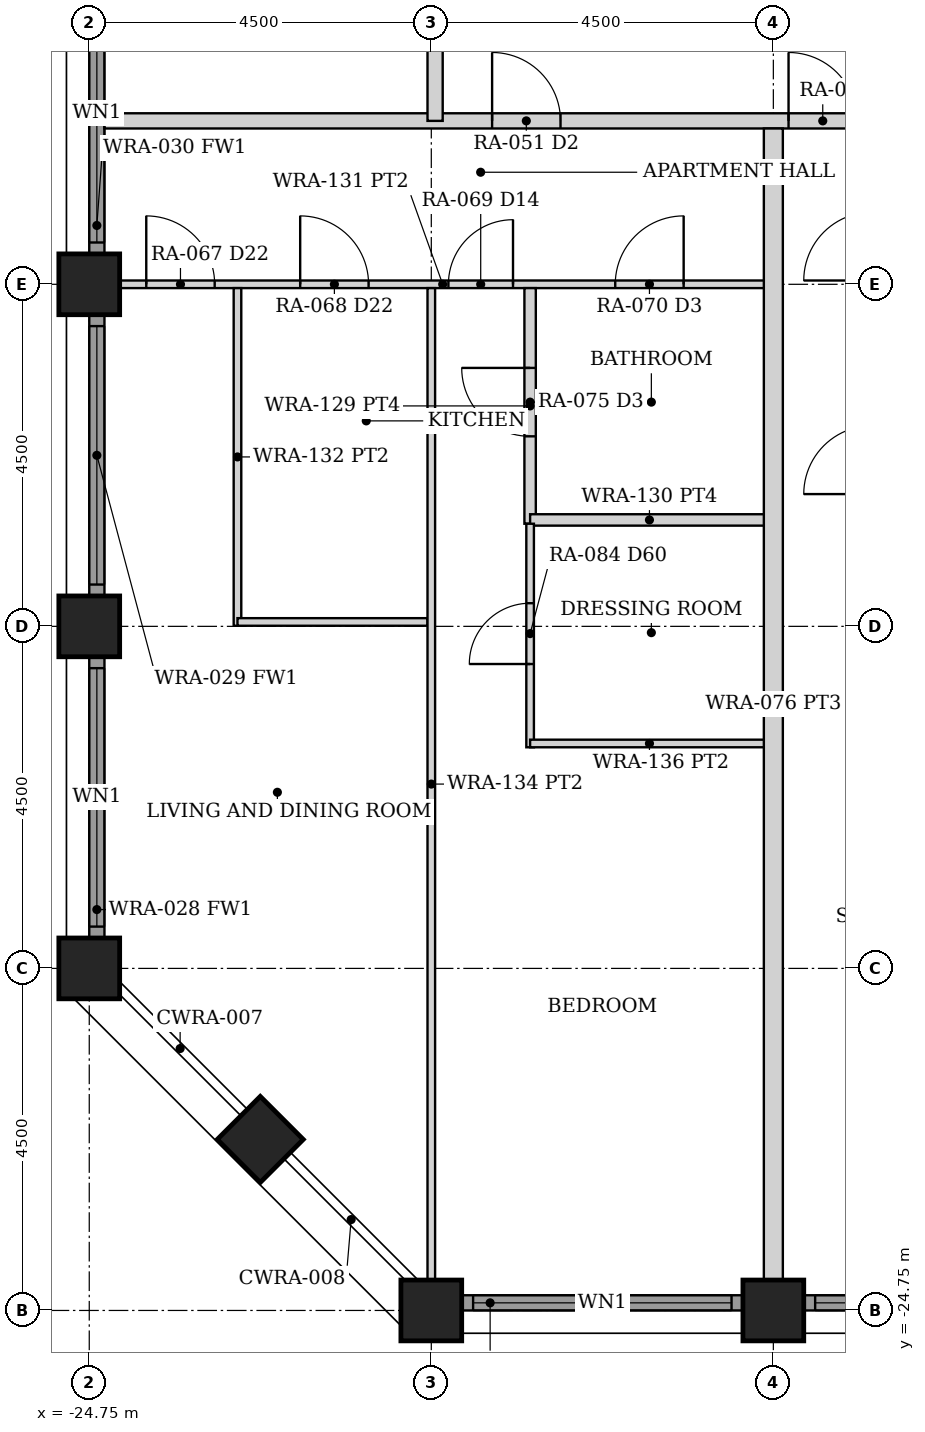
"""IFC4 building model, lengths in metres.
Left out: names, types, materials, properties, quantities, classifications, styles, units other than length and angle.
Written with IfcOpenShell. Run it as: python <this file> out.ifc"""

import sys

from ifc_helpers import new_model, si_unit, direction, frame, frame_2d, origin, origin_2d, place, context, subcontext, project, spatial, rectangle, hollow_rectangle, extrude, element, fill, save


model = new_model("IFC4")
c1 = context("Model", 3, precision=1e-05, world=origin(), true_north=direction((0.0, 1.0)))
c2 = subcontext(c1, "Body", "Model", "MODEL_VIEW")
j1 = project(units=[si_unit("LENGTHUNIT", "METRE"), si_unit("PLANEANGLEUNIT", "RADIAN")], contexts=[c1])
p1 = place(None, origin())
s1 = spatial("IfcSite", under=j1, at=p1, CompositionType="ELEMENT")
p2 = place(p1, origin())
s2 = spatial("IfcBuilding", under=s1, at=p2, CompositionType="ELEMENT")
p3 = place(p2, frame((0.0, 0.0, 30.0)))
s3 = spatial("IfcBuildingStorey", under=s2, at=p3, CompositionType="ELEMENT", Elevation=30.0)
for number, where, z_axis, x_axis in (
    (1, (-20.25, -24.75, 0.0), (0.0, 0.0, 1.0), (0.0, 1.0, 0.0)),
    (2, (-24.75, -20.25, 0.0), (0.0, 0.0, 1.0), (1.0, 0.0, 0.0)),
    (3, (-15.75, -24.75, 0.0), (0.0, 0.0, 1.0), (0.0, 1.0, 0.0)),
    (4, (-24.75, -15.75, 0.0), (0.0, 0.0, 1.0), (1.0, 0.0, 0.0)),
    (5, (-24.75, -11.25, 0.0), (0.0, 0.0, 1.0), (1.0, 0.0, 0.0)),
    (6, (-22.5, -22.5, 0.0), (0.0, 0.0, 1.0), (0.707, 0.707, 0.0)),
):
    element("IfcColumn", number, at=place(p3, frame(where, z_axis=z_axis, x_axis=x_axis)), inside=s3, PredefinedType="COLUMN", context=c2, shape_type="SweptSolid", body=[
        extrude(hollow_rectangle(XDim=0.8, YDim=0.8, WallThickness=0.08, at=origin_2d()), origin(), (0.0, 0.0, 1.0), 3.5),
    ])
p4 = place(p3, frame((-19.845, -24.65, 0.0), z_axis=(0.0, 0.0, 1.0), x_axis=(1.0, 0.0, 0.0)))
e7 = element("IfcWall", 7, at=p4, inside=s3, PredefinedType="SOLIDWALL", context=c2, shape_type="SweptSolid", body=[
    extrude(rectangle(XDim=3.69, YDim=0.2, at=frame_2d((1.845, 0.0))), origin(), (0.0, 0.0, 1.0), 2.379),
])
p5 = place(p4, frame((0.145, 0.0, 0.3)))
e8 = element("IfcOpeningElement", 8, at=p5, cuts=e7, PredefinedType="OPENING", context=c2, shape_type="SweptSolid", body=[
    extrude(rectangle(XDim=3.4, YDim=1.929, at=frame_2d((1.7, 0.964))), frame((0.0, 0.11, 0.0), z_axis=(0.0, -1.0, 0.0), x_axis=(1.0, 0.0, 0.0)), (0.0, 0.0, 1.0), 0.22),
])
p6 = place(p3, frame((-15.345, -24.65, 0.0), z_axis=(0.0, 0.0, 1.0), x_axis=(1.0, 0.0, 0.0)))
e9 = element("IfcWall", 9, at=p6, inside=s3, PredefinedType="SOLIDWALL", context=c2, shape_type="SweptSolid", body=[
    extrude(rectangle(XDim=3.69, YDim=0.2, at=frame_2d((1.845, 0.0))), origin(), (0.0, 0.0, 1.0), 2.379),
])
p7 = place(p6, frame((0.145, 0.0, 0.3)))
e10 = element("IfcOpeningElement", 10, at=p7, cuts=e9, PredefinedType="OPENING", context=c2, shape_type="SweptSolid", body=[
    extrude(rectangle(XDim=3.4, YDim=1.929, at=frame_2d((1.7, 0.964))), frame((0.0, 0.11, 0.0), z_axis=(0.0, -1.0, 0.0), x_axis=(1.0, 0.0, 0.0)), (0.0, 0.0, 1.0), 0.22),
])
p8 = place(p3, frame((-24.65, -19.845, 0.0), z_axis=(0.0, 0.0, 1.0), x_axis=(0.0, 1.0, 0.0)))
e11 = element("IfcWall", 11, at=p8, inside=s3, PredefinedType="SOLIDWALL", context=c2, shape_type="SweptSolid", body=[
    extrude(rectangle(XDim=3.69, YDim=0.2, at=frame_2d((1.845, 0.0))), origin(), (0.0, 0.0, 1.0), 2.379),
])
p9 = place(p8, frame((0.145, 0.0, 0.3)))
e12 = element("IfcOpeningElement", 12, at=p9, cuts=e11, PredefinedType="OPENING", context=c2, shape_type="SweptSolid", body=[
    extrude(rectangle(XDim=3.4, YDim=1.929, at=frame_2d((1.7, 0.964))), frame((0.0, 0.11, 0.0), z_axis=(0.0, -1.0, 0.0), x_axis=(1.0, 0.0, 0.0)), (0.0, 0.0, 1.0), 0.22),
])
p10 = place(p3, frame((-24.65, -15.345, 0.0), z_axis=(0.0, 0.0, 1.0), x_axis=(0.0, 1.0, 0.0)))
e13 = element("IfcWall", 13, at=p10, inside=s3, PredefinedType="SOLIDWALL", context=c2, shape_type="SweptSolid", body=[
    extrude(rectangle(XDim=3.69, YDim=0.2, at=frame_2d((1.845, 0.0))), origin(), (0.0, 0.0, 1.0), 2.379),
])
p11 = place(p10, frame((0.145, 0.0, 0.3)))
e14 = element("IfcOpeningElement", 14, at=p11, cuts=e13, PredefinedType="OPENING", context=c2, shape_type="SweptSolid", body=[
    extrude(rectangle(XDim=3.4, YDim=1.929, at=frame_2d((1.7, 0.964))), frame((0.0, 0.11, 0.0), z_axis=(0.0, -1.0, 0.0), x_axis=(1.0, 0.0, 0.0)), (0.0, 0.0, 1.0), 0.22),
])
p12 = place(p3, frame((-24.65, -10.845, 0.0), z_axis=(0.0, 0.0, 1.0), x_axis=(0.0, 1.0, 0.0)))
e15 = element("IfcWall", 15, at=p12, inside=s3, PredefinedType="SOLIDWALL", context=c2, shape_type="SweptSolid", body=[
    extrude(rectangle(XDim=3.69, YDim=0.2, at=frame_2d((1.845, 0.0))), origin(), (0.0, 0.0, 1.0), 2.379),
])
p13 = place(p12, frame((0.145, 0.0, 0.3)))
e16 = element("IfcOpeningElement", 16, at=p13, cuts=e15, PredefinedType="OPENING", context=c2, shape_type="SweptSolid", body=[
    extrude(rectangle(XDim=3.4, YDim=1.929, at=frame_2d((1.7, 0.964))), frame((0.0, 0.11, 0.0), z_axis=(0.0, -1.0, 0.0), x_axis=(1.0, 0.0, 0.0)), (0.0, 0.0, 1.0), 0.22),
])
p14 = place(p3, frame((-24.55, -9.1, 0.0), z_axis=(0.0, 0.0, 1.0), x_axis=(1.0, 0.0, 0.0)))
e17 = element("IfcWall", 17, at=p14, inside=s3, PredefinedType="PARTITIONING", context=c2, shape_type="SweptSolid", body=[
    extrude(rectangle(XDim=49.1, YDim=0.2, at=frame_2d((24.55, 0.0))), origin(), (0.0, 0.0, 1.0), 2.373),
])
p15 = place(p14, frame((5.1, 0.0, 0.0)))
e18 = element("IfcOpeningElement", 18, at=p15, cuts=e17, PredefinedType="OPENING", context=c2, shape_type="SweptSolid", body=[
    extrude(rectangle(XDim=0.9, YDim=2.1, at=frame_2d((0.45, 1.05))), frame((0.0, 0.11, 0.0), z_axis=(0.0, -1.0, 0.0), x_axis=(1.0, 0.0, 0.0)), (0.0, 0.0, 1.0), 0.22),
])
p16 = place(p14, frame((9.0, 0.0, 0.0)))
e19 = element("IfcOpeningElement", 19, at=p16, cuts=e17, PredefinedType="OPENING", context=c2, shape_type="SweptSolid", body=[
    extrude(rectangle(XDim=0.9, YDim=2.1, at=frame_2d((0.45, 1.05))), frame((0.0, 0.11, 0.0), z_axis=(0.0, -1.0, 0.0), x_axis=(1.0, 0.0, 0.0)), (0.0, 0.0, 1.0), 0.22),
])
p17 = place(p14, frame((13.5, 0.0, 0.0)))
e20 = element("IfcOpeningElement", 20, at=p17, cuts=e17, PredefinedType="OPENING", context=c2, shape_type="SweptSolid", body=[
    extrude(rectangle(XDim=0.9, YDim=2.1, at=frame_2d((0.45, 1.05))), frame((0.0, 0.11, 0.0), z_axis=(0.0, -1.0, 0.0), x_axis=(1.0, 0.0, 0.0)), (0.0, 0.0, 1.0), 0.22),
])
p18 = place(p14, frame((18.0, 0.0, 0.0)))
e21 = element("IfcOpeningElement", 21, at=p18, cuts=e17, PredefinedType="OPENING", context=c2, shape_type="SweptSolid", body=[
    extrude(rectangle(XDim=0.9, YDim=2.1, at=frame_2d((0.45, 1.05))), frame((0.0, 0.11, 0.0), z_axis=(0.0, -1.0, 0.0), x_axis=(1.0, 0.0, 0.0)), (0.0, 0.0, 1.0), 0.22),
])
p19 = place(p14, frame((22.5, 0.0, 0.0)))
e22 = element("IfcOpeningElement", 22, at=p19, cuts=e17, PredefinedType="OPENING", context=c2, shape_type="SweptSolid", body=[
    extrude(rectangle(XDim=0.9, YDim=2.1, at=frame_2d((0.45, 1.05))), frame((0.0, 0.11, 0.0), z_axis=(0.0, -1.0, 0.0), x_axis=(1.0, 0.0, 0.0)), (0.0, 0.0, 1.0), 0.22),
])
p20 = place(p14, frame((27.0, 0.0, 0.0)))
e23 = element("IfcOpeningElement", 23, at=p20, cuts=e17, PredefinedType="OPENING", context=c2, shape_type="SweptSolid", body=[
    extrude(rectangle(XDim=0.9, YDim=2.1, at=frame_2d((0.45, 1.05))), frame((0.0, 0.11, 0.0), z_axis=(0.0, -1.0, 0.0), x_axis=(1.0, 0.0, 0.0)), (0.0, 0.0, 1.0), 0.22),
])
p21 = place(p14, frame((31.5, 0.0, 0.0)))
e24 = element("IfcOpeningElement", 24, at=p21, cuts=e17, PredefinedType="OPENING", context=c2, shape_type="SweptSolid", body=[
    extrude(rectangle(XDim=0.9, YDim=2.1, at=frame_2d((0.45, 1.05))), frame((0.0, 0.11, 0.0), z_axis=(0.0, -1.0, 0.0), x_axis=(1.0, 0.0, 0.0)), (0.0, 0.0, 1.0), 0.22),
])
p22 = place(p14, frame((36.0, 0.0, 0.0)))
e25 = element("IfcOpeningElement", 25, at=p22, cuts=e17, PredefinedType="OPENING", context=c2, shape_type="SweptSolid", body=[
    extrude(rectangle(XDim=0.9, YDim=2.1, at=frame_2d((0.45, 1.05))), frame((0.0, 0.11, 0.0), z_axis=(0.0, -1.0, 0.0), x_axis=(1.0, 0.0, 0.0)), (0.0, 0.0, 1.0), 0.22),
])
p23 = place(p14, frame((43.1, 0.0, 0.0)))
e26 = element("IfcOpeningElement", 26, at=p23, cuts=e17, PredefinedType="OPENING", context=c2, shape_type="SweptSolid", body=[
    extrude(rectangle(XDim=0.9, YDim=2.1, at=frame_2d((0.45, 1.05))), frame((0.0, 0.11, 0.0), z_axis=(0.0, -1.0, 0.0), x_axis=(1.0, 0.0, 0.0)), (0.0, 0.0, 1.0), 0.22),
])
p24 = place(p3, frame((-20.2, -9.1, 0.0), z_axis=(0.0, 0.0, 1.0), x_axis=(0.0, 1.0, 0.0)))
e27 = element("IfcWall", 27, at=p24, inside=s3, PredefinedType="PARTITIONING", context=c2, shape_type="SweptSolid", body=[
    extrude(rectangle(XDim=18.2, YDim=0.2, at=frame_2d((9.1, 0.0))), origin(), (0.0, 0.0, 1.0), 2.373),
])
p25 = place(p24, frame((8.6, 0.0, 0.0)))
e28 = element("IfcOpeningElement", 28, at=p25, cuts=e27, PredefinedType="OPENING", context=c2, shape_type="SweptSolid", body=[
    extrude(rectangle(XDim=1.0, YDim=2.1, at=frame_2d((0.5, 1.05))), frame((0.0, 0.11, 0.0), z_axis=(0.0, -1.0, 0.0), x_axis=(1.0, 0.0, 0.0)), (0.0, 0.0, 1.0), 0.22),
])
p26 = place(p3, frame((-24.35, -11.25, 0.0), z_axis=(0.0, 0.0, 1.0), x_axis=(1.0, 0.0, 0.0)))
e29 = element("IfcWall", 29, at=p26, inside=s3, PredefinedType="PARTITIONING", context=c2, shape_type="SweptSolid", body=[
    extrude(rectangle(XDim=8.5, YDim=0.1, at=frame_2d((4.25, 0.0))), origin(), (0.0, 0.0, 1.0), 2.373),
])
p27 = place(p26, frame((2.375, 0.0, 0.0)))
e30 = element("IfcOpeningElement", 30, at=p27, cuts=e29, PredefinedType="OPENING", context=c2, shape_type="SweptSolid", body=[
    extrude(rectangle(XDim=0.9, YDim=2.1, at=frame_2d((0.45, 1.05))), frame((0.0, 0.06, 0.0), z_axis=(0.0, -1.0, 0.0), x_axis=(1.0, 0.0, 0.0)), (0.0, 0.0, 1.0), 0.12),
])
p28 = place(p26, frame((0.35, 0.0, 0.0)))
e31 = element("IfcOpeningElement", 31, at=p28, cuts=e29, PredefinedType="OPENING", context=c2, shape_type="SweptSolid", body=[
    extrude(rectangle(XDim=0.9, YDim=2.1, at=frame_2d((0.45, 1.05))), frame((0.0, 0.06, 0.0), z_axis=(0.0, -1.0, 0.0), x_axis=(1.0, 0.0, 0.0)), (0.0, 0.0, 1.0), 0.12),
])
p29 = place(p26, frame((4.325, 0.0, 0.0)))
e32 = element("IfcOpeningElement", 32, at=p29, cuts=e29, PredefinedType="OPENING", context=c2, shape_type="SweptSolid", body=[
    extrude(rectangle(XDim=0.85, YDim=2.1, at=frame_2d((0.425, 1.05))), frame((0.0, 0.06, 0.0), z_axis=(0.0, -1.0, 0.0), x_axis=(1.0, 0.0, 0.0)), (0.0, 0.0, 1.0), 0.12),
])
p30 = place(p26, frame((6.52, 0.0, 0.0)))
e33 = element("IfcOpeningElement", 33, at=p30, cuts=e29, PredefinedType="OPENING", context=c2, shape_type="SweptSolid", body=[
    extrude(rectangle(XDim=0.9, YDim=2.1, at=frame_2d((0.45, 1.05))), frame((0.0, 0.06, 0.0), z_axis=(0.0, -1.0, 0.0), x_axis=(1.0, 0.0, 0.0)), (0.0, 0.0, 1.0), 0.12),
])
p31 = place(p3, frame((-22.8, -15.742, 0.0), z_axis=(0.0, 0.0, 1.0), x_axis=(0.0, 1.0, 0.0)))
e34 = element("IfcWall", 34, at=p31, inside=s3, PredefinedType="PARTITIONING", context=c2, shape_type="SweptSolid", body=[
    extrude(rectangle(XDim=4.442, YDim=0.1, at=frame_2d((2.221, 0.0))), origin(), (0.0, 0.0, 1.0), 2.373),
])
p32 = place(p3, frame((-22.8, -15.692, 0.0), z_axis=(0.0, 0.0, 1.0), x_axis=(1.0, 0.0, 0.0)))
e35 = element("IfcWall", 35, at=p32, inside=s3, PredefinedType="PARTITIONING", context=c2, shape_type="SweptSolid", body=[
    extrude(rectangle(XDim=2.5, YDim=0.1, at=frame_2d((1.25, 0.0))), origin(), (0.0, 0.0, 1.0), 2.373),
])
p33 = place(p3, frame((-20.25, -24.35, 0.0), z_axis=(0.0, 0.0, 1.0), x_axis=(0.0, 1.0, 0.0)))
e36 = element("IfcWall", 36, at=p33, inside=s3, PredefinedType="PARTITIONING", context=c2, shape_type="SweptSolid", body=[
    extrude(rectangle(XDim=13.05, YDim=0.1, at=frame_2d((6.525, 0.0))), origin(), (0.0, 0.0, 1.0), 2.373),
])
p34 = place(p3, frame((-18.95, -14.4, 0.0), z_axis=(0.0, 0.0, 1.0), x_axis=(0.0, 1.0, 0.0)))
e37 = element("IfcWall", 37, at=p34, inside=s3, PredefinedType="PARTITIONING", context=c2, shape_type="SweptSolid", body=[
    extrude(rectangle(XDim=3.1, YDim=0.15, at=frame_2d((1.55, 0.0))), origin(), (0.0, 0.0, 1.0), 2.373),
])
p35 = place(p34, frame((1.15, 0.0, 0.0)))
e38 = element("IfcOpeningElement", 38, at=p35, cuts=e37, PredefinedType="OPENING", context=c2, shape_type="SweptSolid", body=[
    extrude(rectangle(XDim=0.9, YDim=2.1, at=frame_2d((0.45, 1.05))), frame((0.0, 0.085, 0.0), z_axis=(0.0, -1.0, 0.0), x_axis=(1.0, 0.0, 0.0)), (0.0, 0.0, 1.0), 0.17),
])
p36 = place(p3, frame((-18.95, -14.35, 0.0), z_axis=(0.0, 0.0, 1.0), x_axis=(1.0, 0.0, 0.0)))
e39 = element("IfcWall", 39, at=p36, inside=s3, PredefinedType="PARTITIONING", context=c2, shape_type="SweptSolid", body=[
    extrude(rectangle(XDim=3.14, YDim=0.15, at=frame_2d((1.57, 0.0))), origin(), (0.0, 0.0, 1.0), 2.373),
])
p37 = place(p3, frame((-18.95, -17.341, 0.0), z_axis=(0.0, 0.0, 1.0), x_axis=(0.0, 1.0, 0.0)))
e40 = element("IfcWall", 40, at=p37, inside=s3, PredefinedType="PARTITIONING", context=c2, shape_type="SweptSolid", body=[
    extrude(rectangle(XDim=2.941, YDim=0.1, at=frame_2d((1.47, 0.0))), origin(), (0.0, 0.0, 1.0), 2.373),
])
p38 = place(p37, frame((1.095, 0.0, 0.0)))
e41 = element("IfcOpeningElement", 41, at=p38, cuts=e40, PredefinedType="OPENING", context=c2, shape_type="SweptSolid", body=[
    extrude(rectangle(XDim=0.8, YDim=2.1, at=frame_2d((0.4, 1.05))), frame((0.0, 0.06, 0.0), z_axis=(0.0, -1.0, 0.0), x_axis=(1.0, 0.0, 0.0)), (0.0, 0.0, 1.0), 0.12),
])
p39 = place(p3, frame((-18.95, -17.291, 0.0), z_axis=(0.0, 0.0, 1.0), x_axis=(1.0, 0.0, 0.0)))
e42 = element("IfcWall", 42, at=p39, inside=s3, PredefinedType="PARTITIONING", context=c2, shape_type="SweptSolid", body=[
    extrude(rectangle(XDim=3.14, YDim=0.1, at=frame_2d((1.57, 0.0))), origin(), (0.0, 0.0, 1.0), 2.373),
])
p40 = place(p3, frame((-15.75, -24.35, 0.0), z_axis=(0.0, 0.0, 1.0), x_axis=(0.0, 1.0, 0.0)))
e43 = element("IfcWall", 43, at=p40, inside=s3, PredefinedType="PARTITIONING", context=c2, shape_type="SweptSolid", body=[
    extrude(rectangle(XDim=15.15, YDim=0.25, at=frame_2d((7.575, 0.0))), origin(), (0.0, 0.0, 1.0), 2.373),
])
p41 = place(p5, origin())
e44 = element("IfcWindow", 44, at=p41, inside=s3, PartitioningType="SINGLE_PANEL", PredefinedType="WINDOW", context=c2, shape_type="SweptSolid", body=[
    extrude(rectangle(XDim=3.4, YDim=1.929, at=frame_2d((1.7, 0.964))), frame((0.0, 0.03, 0.0), z_axis=(0.0, -1.0, 0.0), x_axis=(1.0, 0.0, 0.0)), (0.0, 0.0, 1.0), 0.06),
])
fill(e8, e44)
p42 = place(p7, origin())
e45 = element("IfcWindow", 45, at=p42, inside=s3, PartitioningType="SINGLE_PANEL", PredefinedType="WINDOW", context=c2, shape_type="SweptSolid", body=[
    extrude(rectangle(XDim=3.4, YDim=1.929, at=frame_2d((1.7, 0.964))), frame((0.0, 0.03, 0.0), z_axis=(0.0, -1.0, 0.0), x_axis=(1.0, 0.0, 0.0)), (0.0, 0.0, 1.0), 0.06),
])
fill(e10, e45)
p43 = place(p9, origin())
e46 = element("IfcWindow", 46, at=p43, inside=s3, PartitioningType="SINGLE_PANEL", PredefinedType="WINDOW", context=c2, shape_type="SweptSolid", body=[
    extrude(rectangle(XDim=3.4, YDim=1.929, at=frame_2d((1.7, 0.964))), frame((0.0, 0.03, 0.0), z_axis=(0.0, -1.0, 0.0), x_axis=(1.0, 0.0, 0.0)), (0.0, 0.0, 1.0), 0.06),
])
fill(e12, e46)
p44 = place(p11, origin())
e47 = element("IfcWindow", 47, at=p44, inside=s3, PartitioningType="SINGLE_PANEL", PredefinedType="WINDOW", context=c2, shape_type="SweptSolid", body=[
    extrude(rectangle(XDim=3.4, YDim=1.929, at=frame_2d((1.7, 0.964))), frame((0.0, 0.03, 0.0), z_axis=(0.0, -1.0, 0.0), x_axis=(1.0, 0.0, 0.0)), (0.0, 0.0, 1.0), 0.06),
])
fill(e14, e47)
p45 = place(p13, origin())
e48 = element("IfcWindow", 48, at=p45, inside=s3, PartitioningType="SINGLE_PANEL", PredefinedType="WINDOW", context=c2, shape_type="SweptSolid", body=[
    extrude(rectangle(XDim=3.4, YDim=1.929, at=frame_2d((1.7, 0.964))), frame((0.0, 0.03, 0.0), z_axis=(0.0, -1.0, 0.0), x_axis=(1.0, 0.0, 0.0)), (0.0, 0.0, 1.0), 0.06),
])
fill(e16, e48)
p46 = place(p15, origin())
e49 = element("IfcDoor", 49, at=p46, inside=s3, OperationType="SINGLE_SWING_LEFT", PredefinedType="DOOR", context=c2, shape_type="SweptSolid", body=[
    extrude(rectangle(XDim=0.9, YDim=2.1, at=frame_2d((0.45, 1.05))), frame((0.0, 0.025, 0.0), z_axis=(0.0, -1.0, 0.0), x_axis=(1.0, 0.0, 0.0)), (0.0, 0.0, 1.0), 0.05),
])
fill(e18, e49)
p47 = place(p27, origin())
e50 = element("IfcDoor", 50, at=p47, inside=s3, OperationType="SINGLE_SWING_LEFT", PredefinedType="DOOR", context=c2, shape_type="SweptSolid", body=[
    extrude(rectangle(XDim=0.9, YDim=2.1, at=frame_2d((0.45, 1.05))), frame((0.0, 0.025, 0.0), z_axis=(0.0, -1.0, 0.0), x_axis=(1.0, 0.0, 0.0)), (0.0, 0.0, 1.0), 0.05),
])
fill(e30, e50)
p48 = place(p28, origin())
e51 = element("IfcDoor", 51, at=p48, inside=s3, OperationType="SINGLE_SWING_LEFT", PredefinedType="DOOR", context=c2, shape_type="SweptSolid", body=[
    extrude(rectangle(XDim=0.9, YDim=2.1, at=frame_2d((0.45, 1.05))), frame((0.0, 0.025, 0.0), z_axis=(0.0, -1.0, 0.0), x_axis=(1.0, 0.0, 0.0)), (0.0, 0.0, 1.0), 0.05),
])
fill(e31, e51)
p49 = place(p29, origin())
e52 = element("IfcDoor", 52, at=p49, inside=s3, OperationType="SINGLE_SWING_RIGHT", PredefinedType="DOOR", context=c2, shape_type="SweptSolid", body=[
    extrude(rectangle(XDim=0.85, YDim=2.1, at=frame_2d((0.425, 1.05))), frame((0.0, 0.025, 0.0), z_axis=(0.0, -1.0, 0.0), x_axis=(1.0, 0.0, 0.0)), (0.0, 0.0, 1.0), 0.05),
])
fill(e32, e52)
p50 = place(p35, origin())
e53 = element("IfcDoor", 53, at=p50, inside=s3, OperationType="SINGLE_SWING_RIGHT", PredefinedType="DOOR", context=c2, shape_type="SweptSolid", body=[
    extrude(rectangle(XDim=0.9, YDim=2.1, at=frame_2d((0.45, 1.05))), frame((0.0, 0.025, 0.0), z_axis=(0.0, -1.0, 0.0), x_axis=(1.0, 0.0, 0.0)), (0.0, 0.0, 1.0), 0.05),
])
fill(e38, e53)
p51 = place(p30, origin())
e54 = element("IfcDoor", 54, at=p51, inside=s3, OperationType="SINGLE_SWING_RIGHT", PredefinedType="DOOR", context=c2, shape_type="SweptSolid", body=[
    extrude(rectangle(XDim=0.9, YDim=2.1, at=frame_2d((0.45, 1.05))), frame((0.0, 0.025, 0.0), z_axis=(0.0, -1.0, 0.0), x_axis=(1.0, 0.0, 0.0)), (0.0, 0.0, 1.0), 0.05),
])
fill(e33, e54)
p52 = place(p38, origin())
e55 = element("IfcDoor", 55, at=p52, inside=s3, OperationType="SINGLE_SWING_LEFT", PredefinedType="DOOR", context=c2, shape_type="SweptSolid", body=[
    extrude(rectangle(XDim=0.8, YDim=2.1, at=frame_2d((0.4, 1.05))), frame((0.0, 0.025, 0.0), z_axis=(0.0, -1.0, 0.0), x_axis=(1.0, 0.0, 0.0)), (0.0, 0.0, 1.0), 0.05),
])
fill(e41, e55)
p53 = place(p16, origin())
e56 = element("IfcDoor", 56, at=p53, inside=s3, OperationType="SINGLE_SWING_LEFT", PredefinedType="DOOR", context=c2, shape_type="SweptSolid", body=[
    extrude(rectangle(XDim=0.9, YDim=2.1, at=frame_2d((0.45, 1.05))), frame((0.0, 0.025, 0.0), z_axis=(0.0, -1.0, 0.0), x_axis=(1.0, 0.0, 0.0)), (0.0, 0.0, 1.0), 0.05),
])
fill(e19, e56)
save(model, sys.argv[1])
